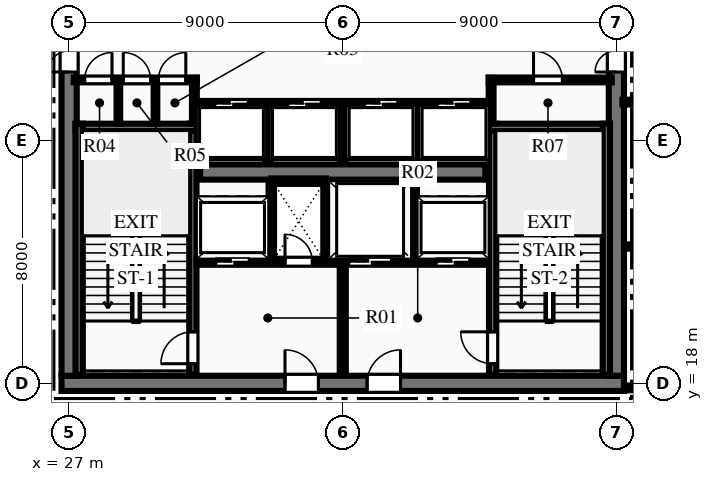
"""IFC4 building model, lengths in metres.
Left out: names, types, materials, properties, quantities, classifications, styles, units other than length and angle.
Written with IfcOpenShell. Run it as: python <this file> out.ifc"""

import sys

from ifc_helpers import new_model, si_unit, direction, frame, frame_2d, origin, place, context, subcontext, project, spatial, rectangle, extrude, element, fill, save


model = new_model("IFC4")
c1 = context("Model", 3, precision=1e-05, world=origin(), true_north=direction((0.0, 1.0)))
c2 = subcontext(c1, "Body", "Model", "MODEL_VIEW")
j1 = project(units=[si_unit("LENGTHUNIT", "METRE"), si_unit("PLANEANGLEUNIT", "RADIAN")], contexts=[c1])
p1 = place(None, origin())
s1 = spatial("IfcSite", under=j1, at=p1, CompositionType="ELEMENT")
p2 = place(p1, origin())
s2 = spatial("IfcBuilding", under=s1, at=p2, CompositionType="ELEMENT")
p3 = place(p2, frame((0.0, 0.0, 140.7)))
s3 = spatial("IfcBuildingStorey", under=s2, at=p3, CompositionType="ELEMENT", Elevation=140.7)
p4 = place(p3, frame((26.75, 18.0, 0.0), z_axis=(0.0, 0.0, 1.0), x_axis=(1.0, 0.0, 0.0)))
e1 = element("IfcWall", 1, at=p4, inside=s3, PredefinedType="SHEAR", context=c2, shape_type="SweptSolid", body=[
    extrude(rectangle(XDim=18.5, YDim=0.5, at=frame_2d((9.25, 0.0))), origin(), (0.0, 0.0, 1.0), 3.75),
])
p5 = place(p4, frame((7.35, 0.0, 0.0)))
e2 = element("IfcOpeningElement", 2, at=p5, cuts=e1, PredefinedType="OPENING", context=c2, shape_type="SweptSolid", body=[
    extrude(rectangle(XDim=1.1, YDim=2.15, at=frame_2d((0.55, 1.075))), frame((0.0, 0.26, 0.0), z_axis=(0.0, -1.0, 0.0), x_axis=(1.0, 0.0, 0.0)), (0.0, 0.0, 1.0), 0.52),
])
p6 = place(p4, frame((10.05, 0.0, 0.0)))
e3 = element("IfcOpeningElement", 3, at=p6, cuts=e1, PredefinedType="OPENING", context=c2, shape_type="SweptSolid", body=[
    extrude(rectangle(XDim=1.1, YDim=2.15, at=frame_2d((0.55, 1.075))), frame((0.0, 0.26, 0.0), z_axis=(0.0, -1.0, 0.0), x_axis=(1.0, 0.0, 0.0)), (0.0, 0.0, 1.0), 0.52),
])
p7 = place(p3, frame((27.0, 18.25, 0.0), z_axis=(0.0, 0.0, 1.0), x_axis=(0.0, 1.0, 0.0)))
e4 = element("IfcWall", 4, at=p7, inside=s3, PredefinedType="SHEAR", context=c2, shape_type="SweptSolid", body=[
    extrude(rectangle(XDim=15.5, YDim=0.5, at=frame_2d((7.75, 0.0))), origin(), (0.0, 0.0, 1.0), 3.75),
])
p8 = place(p7, frame((9.99, 0.0, 0.0)))
e5 = element("IfcOpeningElement", 5, at=p8, cuts=e4, PredefinedType="OPENING", context=c2, shape_type="SweptSolid", body=[
    extrude(rectangle(XDim=1.4, YDim=2.2, at=frame_2d((0.7, 1.1))), frame((0.0, 0.26, 0.0), z_axis=(0.0, -1.0, 0.0), x_axis=(1.0, 0.0, 0.0)), (0.0, 0.0, 1.0), 0.52),
])
p9 = place(p3, frame((45.0, 18.25, 0.0), z_axis=(0.0, 0.0, 1.0), x_axis=(0.0, 1.0, 0.0)))
e6 = element("IfcWall", 6, at=p9, inside=s3, PredefinedType="SHEAR", context=c2, shape_type="SweptSolid", body=[
    extrude(rectangle(XDim=15.5, YDim=0.5, at=frame_2d((7.75, 0.0))), origin(), (0.0, 0.0, 1.0), 3.75),
])
p10 = place(p9, frame((9.99, 0.0, 0.0)))
e7 = element("IfcOpeningElement", 7, at=p10, cuts=e6, PredefinedType="OPENING", context=c2, shape_type="SweptSolid", body=[
    extrude(rectangle(XDim=1.4, YDim=2.2, at=frame_2d((0.7, 1.1))), frame((0.0, 0.26, 0.0), z_axis=(0.0, -1.0, 0.0), x_axis=(1.0, 0.0, 0.0)), (0.0, 0.0, 1.0), 0.52),
])
p11 = place(p3, frame((31.31, 24.95, 0.0), z_axis=(0.0, 0.0, 1.0), x_axis=(1.0, 0.0, 0.0)))
e8 = element("IfcWall", 8, at=p11, inside=s3, PredefinedType="SHEAR", context=c2, shape_type="SweptSolid", body=[
    extrude(rectangle(XDim=9.38, YDim=0.5, at=frame_2d((4.69, 0.0))), origin(), (0.0, 0.0, 1.0), 3.75),
])
p12 = place(p3, frame((31.07, 18.28, 0.0), z_axis=(0.0, 0.0, 1.0), x_axis=(0.0, 1.0, 0.0)))
e9 = element("IfcWall", 9, at=p12, inside=s3, PredefinedType="SHEAR", context=c2, shape_type="SweptSolid", body=[
    extrude(rectangle(XDim=8.26, YDim=0.24, at=frame_2d((4.13, 0.0))), origin(), (0.0, 0.0, 1.0), 3.75),
])
p13 = place(p12, frame((0.365, 0.0, 0.0)))
e10 = element("IfcOpeningElement", 10, at=p13, cuts=e9, PredefinedType="OPENING", context=c2, shape_type="SweptSolid", body=[
    extrude(rectangle(XDim=1.05, YDim=2.15, at=frame_2d((0.525, 1.075))), frame((0.0, 0.13, 0.0), z_axis=(0.0, -1.0, 0.0), x_axis=(1.0, 0.0, 0.0)), (0.0, 0.0, 1.0), 0.26),
])
p14 = place(p3, frame((27.21, 26.42, 0.0), z_axis=(0.0, 0.0, 1.0), x_axis=(1.0, 0.0, 0.0)))
e11 = element("IfcWall", 11, at=p14, inside=s3, PredefinedType="SHEAR", context=c2, shape_type="SweptSolid", body=[
    extrude(rectangle(XDim=3.98, YDim=0.24, at=frame_2d((1.99, 0.0))), origin(), (0.0, 0.0, 1.0), 3.75),
])
p15 = place(p3, frame((27.33, 18.28, 0.0), z_axis=(0.0, 0.0, 1.0), x_axis=(0.0, 1.0, 0.0)))
e12 = element("IfcWall", 12, at=p15, inside=s3, PredefinedType="SHEAR", context=c2, shape_type="SweptSolid", body=[
    extrude(rectangle(XDim=8.26, YDim=0.24, at=frame_2d((4.13, 0.0))), origin(), (0.0, 0.0, 1.0), 3.75),
])
p16 = place(p3, frame((40.93, 18.28, 0.0), z_axis=(0.0, 0.0, 1.0), x_axis=(0.0, 1.0, 0.0)))
e13 = element("IfcWall", 13, at=p16, inside=s3, PredefinedType="SHEAR", context=c2, shape_type="SweptSolid", body=[
    extrude(rectangle(XDim=8.26, YDim=0.24, at=frame_2d((4.13, 0.0))), origin(), (0.0, 0.0, 1.0), 3.75),
])
p17 = place(p16, frame((0.365, 0.0, 0.0)))
e14 = element("IfcOpeningElement", 14, at=p17, cuts=e13, PredefinedType="OPENING", context=c2, shape_type="SweptSolid", body=[
    extrude(rectangle(XDim=1.05, YDim=2.15, at=frame_2d((0.525, 1.075))), frame((0.0, 0.13, 0.0), z_axis=(0.0, -1.0, 0.0), x_axis=(1.0, 0.0, 0.0)), (0.0, 0.0, 1.0), 0.26),
])
p18 = place(p3, frame((40.81, 26.42, 0.0), z_axis=(0.0, 0.0, 1.0), x_axis=(1.0, 0.0, 0.0)))
e15 = element("IfcWall", 15, at=p18, inside=s3, PredefinedType="SHEAR", context=c2, shape_type="SweptSolid", body=[
    extrude(rectangle(XDim=3.98, YDim=0.24, at=frame_2d((1.99, 0.0))), origin(), (0.0, 0.0, 1.0), 3.75),
])
p19 = place(p3, frame((44.67, 18.28, 0.0), z_axis=(0.0, 0.0, 1.0), x_axis=(0.0, 1.0, 0.0)))
e16 = element("IfcWall", 16, at=p19, inside=s3, PredefinedType="SHEAR", context=c2, shape_type="SweptSolid", body=[
    extrude(rectangle(XDim=8.26, YDim=0.24, at=frame_2d((4.13, 0.0))), origin(), (0.0, 0.0, 1.0), 3.75),
])
p20 = place(p3, frame((36.0, 18.28, 0.0), z_axis=(0.0, 0.0, 1.0), x_axis=(0.0, 1.0, 0.0)))
e17 = element("IfcWall", 17, at=p20, inside=s3, PredefinedType="PARTITIONING", context=c2, shape_type="SweptSolid", body=[
    extrude(rectangle(XDim=3.77, YDim=0.2, at=frame_2d((1.885, 0.0))), origin(), (0.0, 0.0, 1.0), 3.46),
])
p21 = place(p3, frame((31.19, 22.0, 0.0), z_axis=(0.0, 0.0, 1.0), x_axis=(1.0, 0.0, 0.0)))
e18 = element("IfcWall", 18, at=p21, inside=s3, PredefinedType="PARTITIONING", context=c2, shape_type="SweptSolid", body=[
    extrude(rectangle(XDim=4.69, YDim=0.2, at=frame_2d((2.345, 0.0))), origin(), (0.0, 0.0, 1.0), 3.46),
])
p22 = place(p21, frame((2.91, 0.0, 0.0)))
e19 = element("IfcOpeningElement", 19, at=p22, cuts=e18, PredefinedType="OPENING", context=c2, shape_type="SweptSolid", body=[
    extrude(rectangle(XDim=0.9, YDim=2.15, at=frame_2d((0.45, 1.075))), frame((0.0, 0.11, 0.0), z_axis=(0.0, -1.0, 0.0), x_axis=(1.0, 0.0, 0.0)), (0.0, 0.0, 1.0), 0.22),
])
p23 = place(p21, frame((0.635, 0.0, 0.0)))
e20 = element("IfcOpeningElement", 20, at=p23, cuts=e18, PredefinedType="OPENING", context=c2, shape_type="SweptSolid", body=[
    extrude(rectangle(XDim=1.1, YDim=2.15, at=frame_2d((0.55, 1.075))), frame((0.0, 0.11, 0.0), z_axis=(0.0, -1.0, 0.0), x_axis=(1.0, 0.0, 0.0)), (0.0, 0.0, 1.0), 0.22),
])
p24 = place(p3, frame((36.12, 22.0, 0.0), z_axis=(0.0, 0.0, 1.0), x_axis=(1.0, 0.0, 0.0)))
e21 = element("IfcWall", 21, at=p24, inside=s3, PredefinedType="PARTITIONING", context=c2, shape_type="SweptSolid", body=[
    extrude(rectangle(XDim=4.69, YDim=0.2, at=frame_2d((2.345, 0.0))), origin(), (0.0, 0.0, 1.0), 3.46),
])
p25 = place(p24, frame((2.955, 0.0, 0.0)))
e22 = element("IfcOpeningElement", 22, at=p25, cuts=e21, PredefinedType="OPENING", context=c2, shape_type="SweptSolid", body=[
    extrude(rectangle(XDim=1.1, YDim=2.15, at=frame_2d((0.55, 1.075))), frame((0.0, 0.11, 0.0), z_axis=(0.0, -1.0, 0.0), x_axis=(1.0, 0.0, 0.0)), (0.0, 0.0, 1.0), 0.22),
])
p26 = place(p24, frame((0.08, 0.0, 0.0)))
e23 = element("IfcOpeningElement", 23, at=p26, cuts=e21, PredefinedType="OPENING", context=c2, shape_type="SweptSolid", body=[
    extrude(rectangle(XDim=1.4, YDim=2.2, at=frame_2d((0.7, 1.1))), frame((0.0, 0.11, 0.0), z_axis=(0.0, -1.0, 0.0), x_axis=(1.0, 0.0, 0.0)), (0.0, 0.0, 1.0), 0.22),
])
for number, where, z_axis, x_axis in (
    (24, (33.65, 22.05, 0.0), (0.0, 0.0, 1.0), (0.0, 1.0, 0.0)),
    (25, (35.45, 22.05, 0.0), (0.0, 0.0, 1.0), (0.0, 1.0, 0.0)),
):
    element("IfcWall", number, at=place(p3, frame(where, z_axis=z_axis, x_axis=x_axis)), inside=s3, PredefinedType="PARTITIONING", context=c2, shape_type="SweptSolid", body=[
        extrude(rectangle(XDim=2.6, YDim=0.18, at=frame_2d((1.3, 0.0))), origin(), (0.0, 0.0, 1.0), 3.46),
    ])
p27 = place(p3, frame((33.65, 24.65, 0.0), z_axis=(0.0, 0.0, 1.0), x_axis=(1.0, 0.0, 0.0)))
e26 = element("IfcWall", 26, at=p27, inside=s3, PredefinedType="PARTITIONING", context=c2, shape_type="SweptSolid", body=[
    extrude(rectangle(XDim=1.8, YDim=0.18, at=frame_2d((0.9, 0.0))), origin(), (0.0, 0.0, 1.0), 3.46),
])
p28 = place(p3, frame((38.35, 22.05, 0.0), z_axis=(0.0, 0.0, 1.0), x_axis=(0.0, 1.0, 0.0)))
e27 = element("IfcWall", 27, at=p28, inside=s3, PredefinedType="PARTITIONING", context=c2, shape_type="SweptSolid", body=[
    extrude(rectangle(XDim=2.6, YDim=0.18, at=frame_2d((1.3, 0.0))), origin(), (0.0, 0.0, 1.0), 3.46),
])
p29 = place(p3, frame((27.15, 27.98, 0.0), z_axis=(0.0, 0.0, 1.0), x_axis=(1.0, 0.0, 0.0)))
e28 = element("IfcWall", 28, at=p29, inside=s3, PredefinedType="PARTITIONING", context=c2, shape_type="SweptSolid", body=[
    extrude(rectangle(XDim=4.05, YDim=0.16, at=frame_2d((2.025, 0.0))), origin(), (0.0, 0.0, 1.0), 3.46),
])
p30 = place(p29, frame((0.36, 0.0, 0.0)))
e29 = element("IfcOpeningElement", 29, at=p30, cuts=e28, PredefinedType="OPENING", context=c2, shape_type="SweptSolid", body=[
    extrude(rectangle(XDim=0.9, YDim=2.15, at=frame_2d((0.45, 1.075))), frame((0.0, 0.09, 0.0), z_axis=(0.0, -1.0, 0.0), x_axis=(1.0, 0.0, 0.0)), (0.0, 0.0, 1.0), 0.18),
])
p31 = place(p29, frame((1.63, 0.0, 0.0)))
e30 = element("IfcOpeningElement", 30, at=p31, cuts=e28, PredefinedType="OPENING", context=c2, shape_type="SweptSolid", body=[
    extrude(rectangle(XDim=0.9, YDim=2.15, at=frame_2d((0.45, 1.075))), frame((0.0, 0.09, 0.0), z_axis=(0.0, -1.0, 0.0), x_axis=(1.0, 0.0, 0.0)), (0.0, 0.0, 1.0), 0.18),
])
p32 = place(p29, frame((2.788, 0.0, 0.0)))
e31 = element("IfcOpeningElement", 31, at=p32, cuts=e28, PredefinedType="OPENING", context=c2, shape_type="SweptSolid", body=[
    extrude(rectangle(XDim=0.9, YDim=2.15, at=frame_2d((0.45, 1.075))), frame((0.0, 0.09, 0.0), z_axis=(0.0, -1.0, 0.0), x_axis=(1.0, 0.0, 0.0)), (0.0, 0.0, 1.0), 0.18),
])
p33 = place(p3, frame((31.12, 26.54, 0.0), z_axis=(0.0, 0.0, 1.0), x_axis=(0.0, 1.0, 0.0)))
e32 = element("IfcWall", 32, at=p33, inside=s3, PredefinedType="PARTITIONING", context=c2, shape_type="SweptSolid", body=[
    extrude(rectangle(XDim=1.51, YDim=0.16, at=frame_2d((0.755, 0.0))), origin(), (0.0, 0.0, 1.0), 3.46),
])
p34 = place(p3, frame((40.8, 27.98, 0.0), z_axis=(0.0, 0.0, 1.0), x_axis=(1.0, 0.0, 0.0)))
e33 = element("IfcWall", 33, at=p34, inside=s3, PredefinedType="PARTITIONING", context=c2, shape_type="SweptSolid", body=[
    extrude(rectangle(XDim=4.05, YDim=0.16, at=frame_2d((2.025, 0.0))), origin(), (0.0, 0.0, 1.0), 3.46),
])
p35 = place(p34, frame((1.475, 0.0, 0.0)))
e34 = element("IfcOpeningElement", 34, at=p35, cuts=e33, PredefinedType="OPENING", context=c2, shape_type="SweptSolid", body=[
    extrude(rectangle(XDim=0.95, YDim=2.15, at=frame_2d((0.475, 1.075))), frame((0.0, 0.09, 0.0), z_axis=(0.0, -1.0, 0.0), x_axis=(1.0, 0.0, 0.0)), (0.0, 0.0, 1.0), 0.18),
])
p36 = place(p3, frame((40.88, 26.54, 0.0), z_axis=(0.0, 0.0, 1.0), x_axis=(0.0, 1.0, 0.0)))
e35 = element("IfcWall", 35, at=p36, inside=s3, PredefinedType="PARTITIONING", context=c2, shape_type="SweptSolid", body=[
    extrude(rectangle(XDim=1.51, YDim=0.16, at=frame_2d((0.755, 0.0))), origin(), (0.0, 0.0, 1.0), 3.46),
])
for number, where, z_axis, x_axis in (
    (36, (28.62, 26.54, 0.0), (0.0, 0.0, 1.0), (0.0, 1.0, 0.0)),
    (37, (29.84, 26.54, 0.0), (0.0, 0.0, 1.0), (0.0, 1.0, 0.0)),
):
    element("IfcWall", number, at=place(p3, frame(where, z_axis=z_axis, x_axis=x_axis)), inside=s3, PredefinedType="PARTITIONING", context=c2, shape_type="SweptSolid", body=[
        extrude(rectangle(XDim=1.44, YDim=0.12, at=frame_2d((0.72, 0.0))), origin(), (0.0, 0.0, 1.0), 3.46),
    ])
p37 = place(p3, frame((31.2, 27.2, 0.0), z_axis=(0.0, 0.0, 1.0), x_axis=(1.0, 0.0, 0.0)))
e38 = element("IfcWall", 38, at=p37, inside=s3, PredefinedType="PARTITIONING", context=c2, shape_type="SweptSolid", body=[
    extrude(rectangle(XDim=9.6, YDim=0.18, at=frame_2d((4.8, 0.0))), origin(), (0.0, 0.0, 1.0), 3.46),
])
p38 = place(p37, frame((0.59, 0.0, 0.0)))
e39 = element("IfcOpeningElement", 39, at=p38, cuts=e38, PredefinedType="OPENING", context=c2, shape_type="SweptSolid", body=[
    extrude(rectangle(XDim=1.1, YDim=2.15, at=frame_2d((0.55, 1.075))), frame((0.0, 0.1, 0.0), z_axis=(0.0, -1.0, 0.0), x_axis=(1.0, 0.0, 0.0)), (0.0, 0.0, 1.0), 0.2),
])
p39 = place(p37, frame((2.99, 0.0, 0.0)))
e40 = element("IfcOpeningElement", 40, at=p39, cuts=e38, PredefinedType="OPENING", context=c2, shape_type="SweptSolid", body=[
    extrude(rectangle(XDim=1.1, YDim=2.15, at=frame_2d((0.55, 1.075))), frame((0.0, 0.1, 0.0), z_axis=(0.0, -1.0, 0.0), x_axis=(1.0, 0.0, 0.0)), (0.0, 0.0, 1.0), 0.2),
])
p40 = place(p37, frame((5.51, 0.0, 0.0)))
e41 = element("IfcOpeningElement", 41, at=p40, cuts=e38, PredefinedType="OPENING", context=c2, shape_type="SweptSolid", body=[
    extrude(rectangle(XDim=1.1, YDim=2.15, at=frame_2d((0.55, 1.075))), frame((0.0, 0.1, 0.0), z_axis=(0.0, -1.0, 0.0), x_axis=(1.0, 0.0, 0.0)), (0.0, 0.0, 1.0), 0.2),
])
p41 = place(p37, frame((7.91, 0.0, 0.0)))
e42 = element("IfcOpeningElement", 42, at=p41, cuts=e38, PredefinedType="OPENING", context=c2, shape_type="SweptSolid", body=[
    extrude(rectangle(XDim=1.1, YDim=2.15, at=frame_2d((0.55, 1.075))), frame((0.0, 0.1, 0.0), z_axis=(0.0, -1.0, 0.0), x_axis=(1.0, 0.0, 0.0)), (0.0, 0.0, 1.0), 0.2),
])
for number, where, z_axis, x_axis in (
    (43, (33.54, 25.3, 0.0), (0.0, 0.0, 1.0), (0.0, 1.0, 0.0)),
    (44, (36.0, 25.3, 0.0), (0.0, 0.0, 1.0), (0.0, 1.0, 0.0)),
    (45, (38.46, 25.3, 0.0), (0.0, 0.0, 1.0), (0.0, 1.0, 0.0)),
):
    element("IfcWall", number, at=place(p3, frame(where, z_axis=z_axis, x_axis=x_axis)), inside=s3, PredefinedType="PARTITIONING", context=c2, shape_type="SweptSolid", body=[
        extrude(rectangle(XDim=1.9, YDim=0.18, at=frame_2d((0.95, 0.0))), origin(), (0.0, 0.0, 1.0), 3.46),
    ])
p42 = place(p3, frame((45.25, 17.85, 0.0), z_axis=(0.0, 0.0, 1.0), x_axis=(1.0, 0.0, 0.0)))
e46 = element("IfcWall", 46, at=p42, inside=s3, PredefinedType="PARTITIONING", context=c2, shape_type="SweptSolid", body=[
    extrude(rectangle(XDim=8.55, YDim=0.16, at=frame_2d((4.275, 0.0))), origin(), (0.0, 0.0, 1.0), 2.998),
])
p43 = place(p42, frame((2.211, 0.0, 0.0)))
e47 = element("IfcOpeningElement", 47, at=p43, cuts=e46, PredefinedType="OPENING", context=c2, shape_type="SweptSolid", body=[
    extrude(rectangle(XDim=1.05, YDim=2.15, at=frame_2d((0.525, 1.075))), frame((0.0, 0.09, 0.0), z_axis=(0.0, -1.0, 0.0), x_axis=(1.0, 0.0, 0.0)), (0.0, 0.0, 1.0), 0.18),
])
p44 = place(p3, frame((45.2, 27.25, 0.0), z_axis=(0.0, 0.0, 1.0), x_axis=(1.0, 0.0, 0.0)))
e48 = element("IfcWall", 48, at=p44, inside=s3, PredefinedType="PARTITIONING", context=c2, shape_type="SweptSolid", body=[
    extrude(rectangle(XDim=2.25, YDim=0.16, at=frame_2d((1.125, 0.0))), origin(), (0.0, 0.0, 1.0), 3.46),
])
p45 = place(p3, frame((45.25, 22.5, 0.0), z_axis=(0.0, 0.0, 1.0), x_axis=(1.0, 0.0, 0.0)))
e49 = element("IfcWall", 49, at=p45, inside=s3, PredefinedType="PARTITIONING", context=c2, shape_type="SweptSolid", body=[
    extrude(rectangle(XDim=21.739, YDim=0.14, at=frame_2d((10.87, 0.0))), origin(), (0.0, 0.0, 1.0), 3.46),
])
p46 = place(p30, origin())
e50 = element("IfcDoor", 50, at=p46, inside=s3, OperationType="SINGLE_SWING_RIGHT", PredefinedType="DOOR", context=c2, shape_type="SweptSolid", body=[
    extrude(rectangle(XDim=0.9, YDim=2.15, at=frame_2d((0.45, 1.075))), frame((0.0, 0.025, 0.0), z_axis=(0.0, -1.0, 0.0), x_axis=(1.0, 0.0, 0.0)), (0.0, 0.0, 1.0), 0.05),
])
fill(e29, e50)
p47 = place(p31, origin())
e51 = element("IfcDoor", 51, at=p47, inside=s3, OperationType="SINGLE_SWING_LEFT", PredefinedType="DOOR", context=c2, shape_type="SweptSolid", body=[
    extrude(rectangle(XDim=0.9, YDim=2.15, at=frame_2d((0.45, 1.075))), frame((0.0, 0.025, 0.0), z_axis=(0.0, -1.0, 0.0), x_axis=(1.0, 0.0, 0.0)), (0.0, 0.0, 1.0), 0.05),
])
fill(e30, e51)
p48 = place(p32, origin())
e52 = element("IfcDoor", 52, at=p48, inside=s3, OperationType="SINGLE_SWING_RIGHT", PredefinedType="DOOR", context=c2, shape_type="SweptSolid", body=[
    extrude(rectangle(XDim=0.9, YDim=2.15, at=frame_2d((0.45, 1.075))), frame((0.0, 0.025, 0.0), z_axis=(0.0, -1.0, 0.0), x_axis=(1.0, 0.0, 0.0)), (0.0, 0.0, 1.0), 0.05),
])
fill(e31, e52)
p49 = place(p35, origin())
e53 = element("IfcDoor", 53, at=p49, inside=s3, OperationType="SINGLE_SWING_LEFT", PredefinedType="DOOR", context=c2, shape_type="SweptSolid", body=[
    extrude(rectangle(XDim=0.95, YDim=2.15, at=frame_2d((0.475, 1.075))), frame((0.0, 0.025, 0.0), z_axis=(0.0, -1.0, 0.0), x_axis=(1.0, 0.0, 0.0)), (0.0, 0.0, 1.0), 0.05),
])
fill(e34, e53)
p50 = place(p13, origin())
e54 = element("IfcDoor", 54, at=p50, inside=s3, OperationType="SINGLE_SWING_LEFT", PredefinedType="DOOR", context=c2, shape_type="SweptSolid", body=[
    extrude(rectangle(XDim=1.05, YDim=2.15, at=frame_2d((0.525, 1.075))), frame((0.0, 0.025, 0.0), z_axis=(0.0, -1.0, 0.0), x_axis=(1.0, 0.0, 0.0)), (0.0, 0.0, 1.0), 0.05),
])
fill(e10, e54)
p51 = place(p17, origin())
e55 = element("IfcDoor", 55, at=p51, inside=s3, OperationType="SINGLE_SWING_RIGHT", PredefinedType="DOOR", context=c2, shape_type="SweptSolid", body=[
    extrude(rectangle(XDim=1.05, YDim=2.15, at=frame_2d((0.525, 1.075))), frame((0.0, 0.025, 0.0), z_axis=(0.0, -1.0, 0.0), x_axis=(1.0, 0.0, 0.0)), (0.0, 0.0, 1.0), 0.05),
])
fill(e14, e55)
p52 = place(p5, origin())
e56 = element("IfcDoor", 56, at=p52, inside=s3, OperationType="SINGLE_SWING_LEFT", PredefinedType="DOOR", context=c2, shape_type="SweptSolid", body=[
    extrude(rectangle(XDim=1.1, YDim=2.15, at=frame_2d((0.55, 1.075))), frame((0.0, 0.025, 0.0), z_axis=(0.0, -1.0, 0.0), x_axis=(1.0, 0.0, 0.0)), (0.0, 0.0, 1.0), 0.05),
])
fill(e2, e56)
p53 = place(p6, origin())
e57 = element("IfcDoor", 57, at=p53, inside=s3, OperationType="SINGLE_SWING_RIGHT", PredefinedType="DOOR", context=c2, shape_type="SweptSolid", body=[
    extrude(rectangle(XDim=1.1, YDim=2.15, at=frame_2d((0.55, 1.075))), frame((0.0, 0.025, 0.0), z_axis=(0.0, -1.0, 0.0), x_axis=(1.0, 0.0, 0.0)), (0.0, 0.0, 1.0), 0.05),
])
fill(e3, e57)
p54 = place(p22, origin())
e58 = element("IfcDoor", 58, at=p54, inside=s3, OperationType="SINGLE_SWING_LEFT", PredefinedType="DOOR", context=c2, shape_type="SweptSolid", body=[
    extrude(rectangle(XDim=0.9, YDim=2.15, at=frame_2d((0.45, 1.075))), frame((0.0, 0.025, 0.0), z_axis=(0.0, -1.0, 0.0), x_axis=(1.0, 0.0, 0.0)), (0.0, 0.0, 1.0), 0.05),
])
fill(e19, e58)
p55 = place(p8, origin())
e59 = element("IfcDoor", 59, at=p55, inside=s3, OperationType="DOUBLE_DOOR_SINGLE_SWING", PredefinedType="DOOR", context=c2, shape_type="SweptSolid", body=[
    extrude(rectangle(XDim=1.4, YDim=2.2, at=frame_2d((0.7, 1.1))), frame((0.0, 0.025, 0.0), z_axis=(0.0, -1.0, 0.0), x_axis=(1.0, 0.0, 0.0)), (0.0, 0.0, 1.0), 0.05),
])
fill(e5, e59)
p56 = place(p10, origin())
e60 = element("IfcDoor", 60, at=p56, inside=s3, OperationType="DOUBLE_DOOR_SINGLE_SWING", PredefinedType="DOOR", context=c2, shape_type="SweptSolid", body=[
    extrude(rectangle(XDim=1.4, YDim=2.2, at=frame_2d((0.7, 1.1))), frame((0.0, 0.025, 0.0), z_axis=(0.0, -1.0, 0.0), x_axis=(1.0, 0.0, 0.0)), (0.0, 0.0, 1.0), 0.05),
])
fill(e7, e60)
p57 = place(p38, origin())
e61 = element("IfcDoor", 61, at=p57, inside=s3, OperationType="SLIDING_TO_LEFT", PredefinedType="DOOR", context=c2, shape_type="SweptSolid", body=[
    extrude(rectangle(XDim=1.1, YDim=2.15, at=frame_2d((0.55, 1.075))), frame((0.0, 0.025, 0.0), z_axis=(0.0, -1.0, 0.0), x_axis=(1.0, 0.0, 0.0)), (0.0, 0.0, 1.0), 0.05),
])
fill(e39, e61)
p58 = place(p39, origin())
e62 = element("IfcDoor", 62, at=p58, inside=s3, OperationType="SLIDING_TO_LEFT", PredefinedType="DOOR", context=c2, shape_type="SweptSolid", body=[
    extrude(rectangle(XDim=1.1, YDim=2.15, at=frame_2d((0.55, 1.075))), frame((0.0, 0.025, 0.0), z_axis=(0.0, -1.0, 0.0), x_axis=(1.0, 0.0, 0.0)), (0.0, 0.0, 1.0), 0.05),
])
fill(e40, e62)
p59 = place(p40, origin())
e63 = element("IfcDoor", 63, at=p59, inside=s3, OperationType="SLIDING_TO_LEFT", PredefinedType="DOOR", context=c2, shape_type="SweptSolid", body=[
    extrude(rectangle(XDim=1.1, YDim=2.15, at=frame_2d((0.55, 1.075))), frame((0.0, 0.025, 0.0), z_axis=(0.0, -1.0, 0.0), x_axis=(1.0, 0.0, 0.0)), (0.0, 0.0, 1.0), 0.05),
])
fill(e41, e63)
p60 = place(p41, origin())
e64 = element("IfcDoor", 64, at=p60, inside=s3, OperationType="SLIDING_TO_LEFT", PredefinedType="DOOR", context=c2, shape_type="SweptSolid", body=[
    extrude(rectangle(XDim=1.1, YDim=2.15, at=frame_2d((0.55, 1.075))), frame((0.0, 0.025, 0.0), z_axis=(0.0, -1.0, 0.0), x_axis=(1.0, 0.0, 0.0)), (0.0, 0.0, 1.0), 0.05),
])
fill(e42, e64)
p61 = place(p23, origin())
e65 = element("IfcDoor", 65, at=p61, inside=s3, OperationType="SLIDING_TO_LEFT", PredefinedType="DOOR", context=c2, shape_type="SweptSolid", body=[
    extrude(rectangle(XDim=1.1, YDim=2.15, at=frame_2d((0.55, 1.075))), frame((0.0, 0.025, 0.0), z_axis=(0.0, -1.0, 0.0), x_axis=(1.0, 0.0, 0.0)), (0.0, 0.0, 1.0), 0.05),
])
fill(e20, e65)
p62 = place(p25, origin())
e66 = element("IfcDoor", 66, at=p62, inside=s3, OperationType="SLIDING_TO_LEFT", PredefinedType="DOOR", context=c2, shape_type="SweptSolid", body=[
    extrude(rectangle(XDim=1.1, YDim=2.15, at=frame_2d((0.55, 1.075))), frame((0.0, 0.025, 0.0), z_axis=(0.0, -1.0, 0.0), x_axis=(1.0, 0.0, 0.0)), (0.0, 0.0, 1.0), 0.05),
])
fill(e22, e66)
p63 = place(p26, origin())
e67 = element("IfcDoor", 67, at=p63, inside=s3, OperationType="SLIDING_TO_LEFT", PredefinedType="DOOR", context=c2, shape_type="SweptSolid", body=[
    extrude(rectangle(XDim=1.4, YDim=2.2, at=frame_2d((0.7, 1.1))), frame((0.0, 0.025, 0.0), z_axis=(0.0, -1.0, 0.0), x_axis=(1.0, 0.0, 0.0)), (0.0, 0.0, 1.0), 0.05),
])
fill(e23, e67)
save(model, sys.argv[1])
